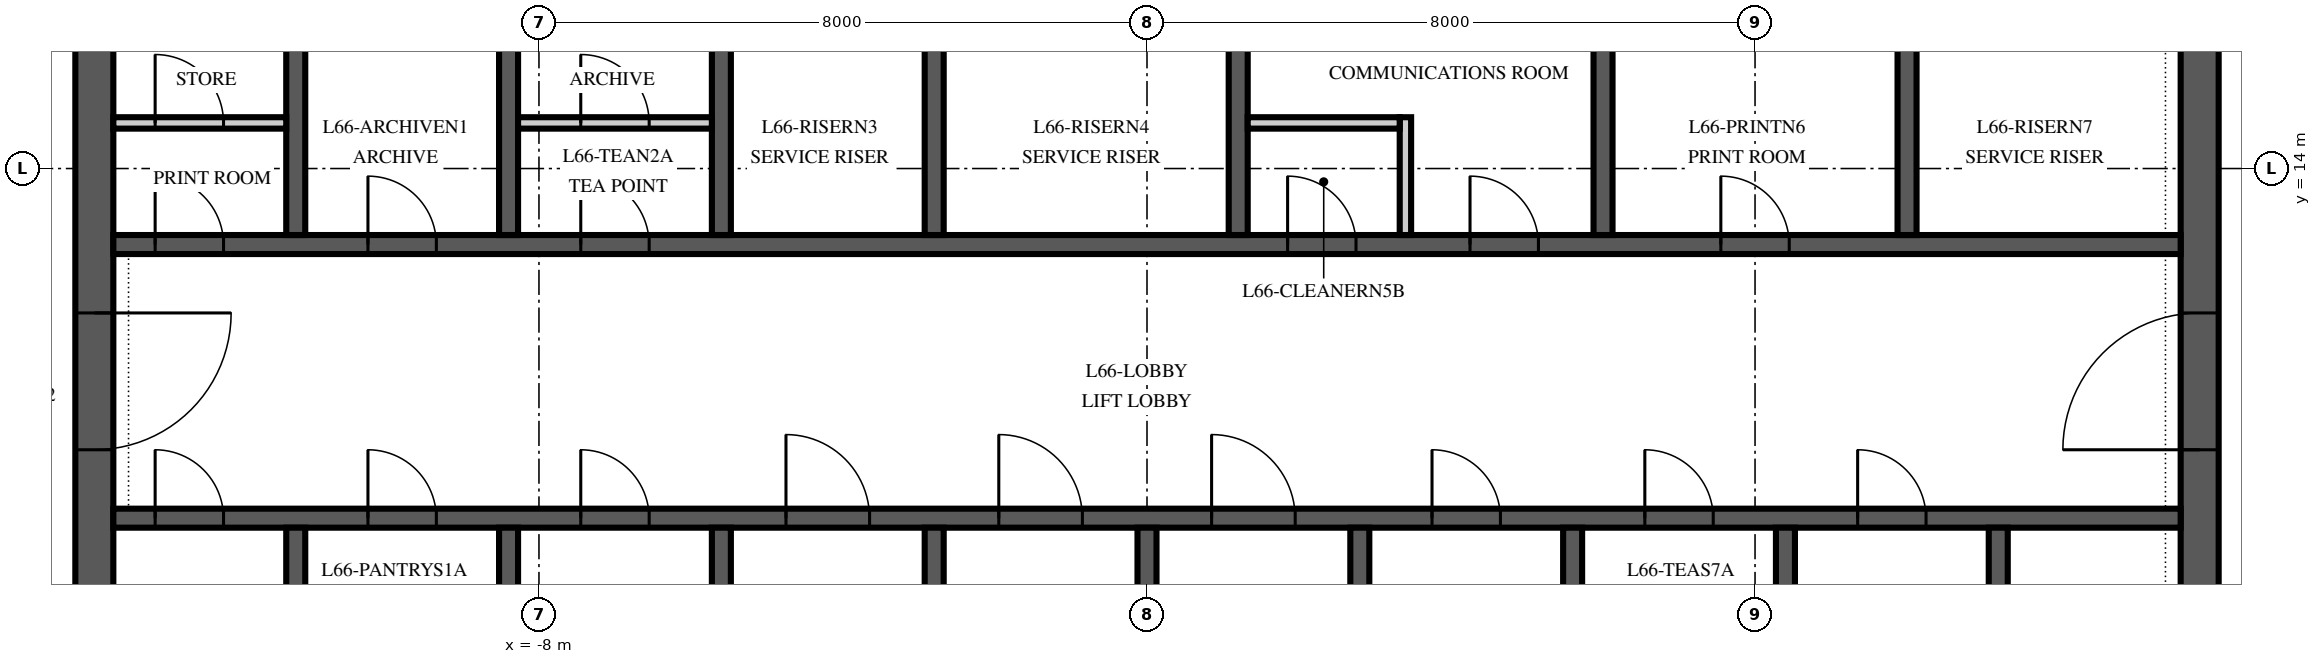
"""IFC4 building model, lengths in metres.
Left out: names, types, materials, properties, quantities, classifications, styles, units other than length and angle.
Written with IfcOpenShell. Run it as: python <this file> out.ifc"""

import sys

from ifc_helpers import new_model, si_unit, direction, frame, frame_2d, origin, place, context, subcontext, project, spatial, polyline, rectangle, outline, extrude, element, fill, save


model = new_model("IFC4")
c1 = context("Model", 3, precision=1e-05, world=origin(), true_north=direction((0.0, 1.0)))
c2 = subcontext(c1, "Body", "Model", "MODEL_VIEW")
j1 = project(units=[si_unit("LENGTHUNIT", "METRE"), si_unit("PLANEANGLEUNIT", "RADIAN")], contexts=[c1])
p1 = place(None, origin())
s1 = spatial("IfcSite", under=j1, at=p1, CompositionType="ELEMENT")
p2 = place(p1, origin())
s2 = spatial("IfcBuilding", under=s1, at=p2, CompositionType="ELEMENT")
p3 = place(p2, frame((0.0, 0.0, 284.0)))
s3 = spatial("IfcBuildingStorey", under=s2, at=p3, CompositionType="ELEMENT", Elevation=284.0)
p4 = place(p3, frame((13.85, 6.15, 0.0), z_axis=(0.0, 0.0, 1.0), x_axis=(0.0, 1.0, 0.0)))
e1 = element("IfcWall", 1, at=p4, inside=s3, PredefinedType="SHEAR", context=c2, shape_type="SweptSolid", body=[
    extrude(outline(polyline([(0.0, -0.25), (17.7, -0.25), (17.7, 0.0), (17.45, 0.0), (17.45, 0.25), (0.25, 0.25), (0.25, 0.0), (0.0, 0.0), (0.0, -0.25)])), origin(), (0.0, 0.0, 1.0), 4.0),
])
p5 = place(p4, frame((4.15, 0.0, 0.0)))
e2 = element("IfcOpeningElement", 2, at=p5, cuts=e1, PredefinedType="OPENING", context=c2, shape_type="SweptSolid", body=[
    extrude(rectangle(XDim=1.8, YDim=2.4, at=frame_2d((0.9, 1.2))), frame((0.0, 0.265, 0.0), z_axis=(0.0, -1.0, 0.0), x_axis=(1.0, 0.0, 0.0)), (0.0, 0.0, 1.0), 0.53),
])
p6 = place(p3, frame((-13.85, 23.85, 0.0), z_axis=(0.0, 0.0, 1.0), x_axis=(0.0, -1.0, 0.0)))
e3 = element("IfcWall", 3, at=p6, inside=s3, PredefinedType="SHEAR", context=c2, shape_type="SweptSolid", body=[
    extrude(outline(polyline([(0.0, -0.25), (17.7, -0.25), (17.7, 0.0), (17.45, 0.0), (17.45, 0.25), (0.25, 0.25), (0.25, 0.0), (0.0, 0.0), (0.0, -0.25)])), origin(), (0.0, 0.0, 1.0), 4.0),
])
p7 = place(p6, frame((11.75, 0.0, 0.0)))
e4 = element("IfcOpeningElement", 4, at=p7, cuts=e3, PredefinedType="OPENING", context=c2, shape_type="SweptSolid", body=[
    extrude(rectangle(XDim=1.8, YDim=2.4, at=frame_2d((0.9, 1.2))), frame((0.0, 0.265, 0.0), z_axis=(0.0, -1.0, 0.0), x_axis=(1.0, 0.0, 0.0)), (0.0, 0.0, 1.0), 0.53),
])
p8 = place(p3, frame((-13.6, 9.4, 0.0), z_axis=(0.0, 0.0, 1.0), x_axis=(1.0, 0.0, 0.0)))
e5 = element("IfcWall", 5, at=p8, inside=s3, PredefinedType="SHEAR", context=c2, shape_type="SweptSolid", body=[
    extrude(rectangle(XDim=27.2, YDim=0.25, at=frame_2d((13.6, 0.0))), origin(), (0.0, 0.0, 1.0), 4.0),
])
p9 = place(p8, frame((8.85, 0.0, 0.0)))
e6 = element("IfcOpeningElement", 6, at=p9, cuts=e5, PredefinedType="OPENING", context=c2, shape_type="SweptSolid", body=[
    extrude(rectangle(XDim=1.1, YDim=2.1, at=frame_2d((0.55, 1.05))), frame((0.0, 0.14, 0.0), z_axis=(0.0, -1.0, 0.0), x_axis=(1.0, 0.0, 0.0)), (0.0, 0.0, 1.0), 0.28),
])
p10 = place(p8, frame((11.65, 0.0, 0.0)))
e7 = element("IfcOpeningElement", 7, at=p10, cuts=e5, PredefinedType="OPENING", context=c2, shape_type="SweptSolid", body=[
    extrude(rectangle(XDim=1.1, YDim=2.1, at=frame_2d((0.55, 1.05))), frame((0.0, 0.14, 0.0), z_axis=(0.0, -1.0, 0.0), x_axis=(1.0, 0.0, 0.0)), (0.0, 0.0, 1.0), 0.28),
])
p11 = place(p8, frame((14.45, 0.0, 0.0)))
e8 = element("IfcOpeningElement", 8, at=p11, cuts=e5, PredefinedType="OPENING", context=c2, shape_type="SweptSolid", body=[
    extrude(rectangle(XDim=1.1, YDim=2.1, at=frame_2d((0.55, 1.05))), frame((0.0, 0.14, 0.0), z_axis=(0.0, -1.0, 0.0), x_axis=(1.0, 0.0, 0.0)), (0.0, 0.0, 1.0), 0.28),
])
p12 = place(p8, frame((0.55, 0.0, 0.0)))
e9 = element("IfcOpeningElement", 9, at=p12, cuts=e5, PredefinedType="OPENING", context=c2, shape_type="SweptSolid", body=[
    extrude(rectangle(XDim=0.9, YDim=2.1, at=frame_2d((0.45, 1.05))), frame((0.0, 0.14, 0.0), z_axis=(0.0, -1.0, 0.0), x_axis=(1.0, 0.0, 0.0)), (0.0, 0.0, 1.0), 0.28),
])
p13 = place(p8, frame((3.35, 0.0, 0.0)))
e10 = element("IfcOpeningElement", 10, at=p13, cuts=e5, PredefinedType="OPENING", context=c2, shape_type="SweptSolid", body=[
    extrude(rectangle(XDim=0.9, YDim=2.1, at=frame_2d((0.45, 1.05))), frame((0.0, 0.14, 0.0), z_axis=(0.0, -1.0, 0.0), x_axis=(1.0, 0.0, 0.0)), (0.0, 0.0, 1.0), 0.28),
])
p14 = place(p8, frame((6.15, 0.0, 0.0)))
e11 = element("IfcOpeningElement", 11, at=p14, cuts=e5, PredefinedType="OPENING", context=c2, shape_type="SweptSolid", body=[
    extrude(rectangle(XDim=0.9, YDim=2.1, at=frame_2d((0.45, 1.05))), frame((0.0, 0.14, 0.0), z_axis=(0.0, -1.0, 0.0), x_axis=(1.0, 0.0, 0.0)), (0.0, 0.0, 1.0), 0.28),
])
p15 = place(p8, frame((17.35, 0.0, 0.0)))
e12 = element("IfcOpeningElement", 12, at=p15, cuts=e5, PredefinedType="OPENING", context=c2, shape_type="SweptSolid", body=[
    extrude(rectangle(XDim=0.9, YDim=2.1, at=frame_2d((0.45, 1.05))), frame((0.0, 0.14, 0.0), z_axis=(0.0, -1.0, 0.0), x_axis=(1.0, 0.0, 0.0)), (0.0, 0.0, 1.0), 0.28),
])
p16 = place(p8, frame((20.15, 0.0, 0.0)))
e13 = element("IfcOpeningElement", 13, at=p16, cuts=e5, PredefinedType="OPENING", context=c2, shape_type="SweptSolid", body=[
    extrude(rectangle(XDim=0.9, YDim=2.1, at=frame_2d((0.45, 1.05))), frame((0.0, 0.14, 0.0), z_axis=(0.0, -1.0, 0.0), x_axis=(1.0, 0.0, 0.0)), (0.0, 0.0, 1.0), 0.28),
])
p17 = place(p8, frame((22.95, 0.0, 0.0)))
e14 = element("IfcOpeningElement", 14, at=p17, cuts=e5, PredefinedType="OPENING", context=c2, shape_type="SweptSolid", body=[
    extrude(rectangle(XDim=0.9, YDim=2.1, at=frame_2d((0.45, 1.05))), frame((0.0, 0.14, 0.0), z_axis=(0.0, -1.0, 0.0), x_axis=(1.0, 0.0, 0.0)), (0.0, 0.0, 1.0), 0.28),
])
p18 = place(p3, frame((-13.6, 13.0, 0.0), z_axis=(0.0, 0.0, 1.0), x_axis=(1.0, 0.0, 0.0)))
e15 = element("IfcWall", 15, at=p18, inside=s3, PredefinedType="SHEAR", context=c2, shape_type="SweptSolid", body=[
    extrude(rectangle(XDim=27.2, YDim=0.25, at=frame_2d((13.6, 0.0))), origin(), (0.0, 0.0, 1.0), 4.0),
])
p19 = place(p18, frame((17.85, 0.0, 0.0)))
e16 = element("IfcOpeningElement", 16, at=p19, cuts=e15, PredefinedType="OPENING", context=c2, shape_type="SweptSolid", body=[
    extrude(rectangle(XDim=0.9, YDim=2.1, at=frame_2d((0.45, 1.05))), frame((0.0, 0.14, 0.0), z_axis=(0.0, -1.0, 0.0), x_axis=(1.0, 0.0, 0.0)), (0.0, 0.0, 1.0), 0.28),
])
p20 = place(p18, frame((15.45, 0.0, 0.0)))
e17 = element("IfcOpeningElement", 17, at=p20, cuts=e15, PredefinedType="OPENING", context=c2, shape_type="SweptSolid", body=[
    extrude(rectangle(XDim=0.9, YDim=2.1, at=frame_2d((0.45, 1.05))), frame((0.0, 0.14, 0.0), z_axis=(0.0, -1.0, 0.0), x_axis=(1.0, 0.0, 0.0)), (0.0, 0.0, 1.0), 0.28),
])
p21 = place(p18, frame((21.15, 0.0, 0.0)))
e18 = element("IfcOpeningElement", 18, at=p21, cuts=e15, PredefinedType="OPENING", context=c2, shape_type="SweptSolid", body=[
    extrude(rectangle(XDim=0.9, YDim=2.1, at=frame_2d((0.45, 1.05))), frame((0.0, 0.14, 0.0), z_axis=(0.0, -1.0, 0.0), x_axis=(1.0, 0.0, 0.0)), (0.0, 0.0, 1.0), 0.28),
])
p22 = place(p18, frame((0.55, 0.0, 0.0)))
e19 = element("IfcOpeningElement", 19, at=p22, cuts=e15, PredefinedType="OPENING", context=c2, shape_type="SweptSolid", body=[
    extrude(rectangle(XDim=0.9, YDim=2.1, at=frame_2d((0.45, 1.05))), frame((0.0, 0.14, 0.0), z_axis=(0.0, -1.0, 0.0), x_axis=(1.0, 0.0, 0.0)), (0.0, 0.0, 1.0), 0.28),
])
p23 = place(p18, frame((3.35, 0.0, 0.0)))
e20 = element("IfcOpeningElement", 20, at=p23, cuts=e15, PredefinedType="OPENING", context=c2, shape_type="SweptSolid", body=[
    extrude(rectangle(XDim=0.9, YDim=2.1, at=frame_2d((0.45, 1.05))), frame((0.0, 0.14, 0.0), z_axis=(0.0, -1.0, 0.0), x_axis=(1.0, 0.0, 0.0)), (0.0, 0.0, 1.0), 0.28),
])
p24 = place(p18, frame((6.15, 0.0, 0.0)))
e21 = element("IfcOpeningElement", 21, at=p24, cuts=e15, PredefinedType="OPENING", context=c2, shape_type="SweptSolid", body=[
    extrude(rectangle(XDim=0.9, YDim=2.1, at=frame_2d((0.45, 1.05))), frame((0.0, 0.14, 0.0), z_axis=(0.0, -1.0, 0.0), x_axis=(1.0, 0.0, 0.0)), (0.0, 0.0, 1.0), 0.28),
])
for number, where, z_axis, x_axis in (
    (22, (-11.2, 6.4, 0.0), (0.0, 0.0, 1.0), (0.0, 1.0, 0.0)),
    (23, (-8.4, 6.4, 0.0), (0.0, 0.0, 1.0), (0.0, 1.0, 0.0)),
    (24, (-5.6, 6.4, 0.0), (0.0, 0.0, 1.0), (0.0, 1.0, 0.0)),
    (25, (-2.8, 6.4, 0.0), (0.0, 0.0, 1.0), (0.0, 1.0, 0.0)),
    (26, (0.0, 6.4, 0.0), (0.0, 0.0, 1.0), (0.0, 1.0, 0.0)),
    (27, (2.8, 6.4, 0.0), (0.0, 0.0, 1.0), (0.0, 1.0, 0.0)),
    (28, (5.6, 6.4, 0.0), (0.0, 0.0, 1.0), (0.0, 1.0, 0.0)),
    (29, (8.4, 6.4, 0.0), (0.0, 0.0, 1.0), (0.0, 1.0, 0.0)),
    (30, (11.2, 6.4, 0.0), (0.0, 0.0, 1.0), (0.0, 1.0, 0.0)),
):
    element("IfcWall", number, at=place(p3, frame(where, z_axis=z_axis, x_axis=x_axis)), inside=s3, PredefinedType="SHEAR", context=c2, shape_type="SweptSolid", body=[
        extrude(rectangle(XDim=2.875, YDim=0.25, at=frame_2d((1.438, 0.0))), origin(), (0.0, 0.0, 1.0), 4.0),
    ])
for number, where, z_axis, x_axis in (
    (31, (-11.2, 13.125, 0.0), (0.0, 0.0, 1.0), (0.0, 1.0, 0.0)),
    (32, (-8.4, 13.125, 0.0), (0.0, 0.0, 1.0), (0.0, 1.0, 0.0)),
    (33, (-5.6, 13.125, 0.0), (0.0, 0.0, 1.0), (0.0, 1.0, 0.0)),
    (34, (-2.8, 13.125, 0.0), (0.0, 0.0, 1.0), (0.0, 1.0, 0.0)),
    (35, (1.2, 13.125, 0.0), (0.0, 0.0, 1.0), (0.0, 1.0, 0.0)),
    (36, (6.0, 13.125, 0.0), (0.0, 0.0, 1.0), (0.0, 1.0, 0.0)),
    (37, (10.0, 13.125, 0.0), (0.0, 0.0, 1.0), (0.0, 1.0, 0.0)),
):
    element("IfcWall", number, at=place(p3, frame(where, z_axis=z_axis, x_axis=x_axis)), inside=s3, PredefinedType="SHEAR", context=c2, shape_type="SweptSolid", body=[
        extrude(rectangle(XDim=2.75, YDim=0.25, at=frame_2d((1.375, 0.0))), origin(), (0.0, 0.0, 1.0), 4.0),
    ])
p25 = place(p3, frame((3.4, 13.125, 0.0), z_axis=(0.0, 0.0, 1.0), x_axis=(0.0, 1.0, 0.0)))
e38 = element("IfcWall", 38, at=p25, inside=s3, PredefinedType="PARTITIONING", context=c2, shape_type="SweptSolid", body=[
    extrude(rectangle(XDim=1.55, YDim=0.15, at=frame_2d((0.775, 0.0))), origin(), (0.0, 0.0, 1.0), 3.85),
])
p26 = place(p3, frame((1.325, 14.6, 0.0), z_axis=(0.0, 0.0, 1.0), x_axis=(1.0, 0.0, 0.0)))
e39 = element("IfcWall", 39, at=p26, inside=s3, PredefinedType="PARTITIONING", context=c2, shape_type="SweptSolid", body=[
    extrude(rectangle(XDim=2.0, YDim=0.15, at=frame_2d((1.0, 0.0))), origin(), (0.0, 0.0, 1.0), 3.85),
])
p27 = place(p3, frame((-13.6, 14.6, 0.0), z_axis=(0.0, 0.0, 1.0), x_axis=(1.0, 0.0, 0.0)))
e40 = element("IfcWall", 40, at=p27, inside=s3, PredefinedType="PARTITIONING", context=c2, shape_type="SweptSolid", body=[
    extrude(rectangle(XDim=2.275, YDim=0.15, at=frame_2d((1.138, 0.0))), origin(), (0.0, 0.0, 1.0), 3.85),
])
p28 = place(p27, frame((0.55, 0.0, 0.0)))
e41 = element("IfcOpeningElement", 41, at=p28, cuts=e40, PredefinedType="OPENING", context=c2, shape_type="SweptSolid", body=[
    extrude(rectangle(XDim=0.9, YDim=2.1, at=frame_2d((0.45, 1.05))), frame((0.0, 0.09, 0.0), z_axis=(0.0, -1.0, 0.0), x_axis=(1.0, 0.0, 0.0)), (0.0, 0.0, 1.0), 0.18),
])
p29 = place(p3, frame((-8.275, 14.6, 0.0), z_axis=(0.0, 0.0, 1.0), x_axis=(1.0, 0.0, 0.0)))
e42 = element("IfcWall", 42, at=p29, inside=s3, PredefinedType="PARTITIONING", context=c2, shape_type="SweptSolid", body=[
    extrude(rectangle(XDim=2.55, YDim=0.15, at=frame_2d((1.275, 0.0))), origin(), (0.0, 0.0, 1.0), 3.85),
])
p30 = place(p29, frame((0.825, 0.0, 0.0)))
e43 = element("IfcOpeningElement", 43, at=p30, cuts=e42, PredefinedType="OPENING", context=c2, shape_type="SweptSolid", body=[
    extrude(rectangle(XDim=0.9, YDim=2.1, at=frame_2d((0.45, 1.05))), frame((0.0, 0.09, 0.0), z_axis=(0.0, -1.0, 0.0), x_axis=(1.0, 0.0, 0.0)), (0.0, 0.0, 1.0), 0.18),
])
p31 = place(p5, origin())
e44 = element("IfcDoor", 44, at=p31, inside=s3, OperationType="DOUBLE_DOOR_SINGLE_SWING", PredefinedType="DOOR", context=c2, shape_type="SweptSolid", body=[
    extrude(rectangle(XDim=1.8, YDim=2.4, at=frame_2d((0.9, 1.2))), frame((0.0, 0.25, 0.0), z_axis=(0.0, -1.0, 0.0), x_axis=(1.0, 0.0, 0.0)), (0.0, 0.0, 1.0), 0.5),
])
fill(e2, e44)
p32 = place(p7, origin())
e45 = element("IfcDoor", 45, at=p32, inside=s3, OperationType="DOUBLE_DOOR_SINGLE_SWING", PredefinedType="DOOR", context=c2, shape_type="SweptSolid", body=[
    extrude(rectangle(XDim=1.8, YDim=2.4, at=frame_2d((0.9, 1.2))), frame((0.0, 0.25, 0.0), z_axis=(0.0, -1.0, 0.0), x_axis=(1.0, 0.0, 0.0)), (0.0, 0.0, 1.0), 0.5),
])
fill(e4, e45)
p33 = place(p9, origin())
e46 = element("IfcDoor", 46, at=p33, inside=s3, OperationType="SLIDING_TO_LEFT", PredefinedType="DOOR", context=c2, shape_type="SweptSolid", body=[
    extrude(rectangle(XDim=1.1, YDim=2.1, at=frame_2d((0.55, 1.05))), frame((0.0, 0.125, 0.0), z_axis=(0.0, -1.0, 0.0), x_axis=(1.0, 0.0, 0.0)), (0.0, 0.0, 1.0), 0.25),
])
fill(e6, e46)
p34 = place(p10, origin())
e47 = element("IfcDoor", 47, at=p34, inside=s3, OperationType="SLIDING_TO_LEFT", PredefinedType="DOOR", context=c2, shape_type="SweptSolid", body=[
    extrude(rectangle(XDim=1.1, YDim=2.1, at=frame_2d((0.55, 1.05))), frame((0.0, 0.125, 0.0), z_axis=(0.0, -1.0, 0.0), x_axis=(1.0, 0.0, 0.0)), (0.0, 0.0, 1.0), 0.25),
])
fill(e7, e47)
p35 = place(p11, origin())
e48 = element("IfcDoor", 48, at=p35, inside=s3, OperationType="SLIDING_TO_LEFT", PredefinedType="DOOR", context=c2, shape_type="SweptSolid", body=[
    extrude(rectangle(XDim=1.1, YDim=2.1, at=frame_2d((0.55, 1.05))), frame((0.0, 0.125, 0.0), z_axis=(0.0, -1.0, 0.0), x_axis=(1.0, 0.0, 0.0)), (0.0, 0.0, 1.0), 0.25),
])
fill(e8, e48)
p36 = place(p19, origin())
e49 = element("IfcDoor", 49, at=p36, inside=s3, OperationType="SINGLE_SWING_LEFT", PredefinedType="DOOR", context=c2, shape_type="SweptSolid", body=[
    extrude(rectangle(XDim=0.9, YDim=2.1, at=frame_2d((0.45, 1.05))), frame((0.0, 0.125, 0.0), z_axis=(0.0, -1.0, 0.0), x_axis=(1.0, 0.0, 0.0)), (0.0, 0.0, 1.0), 0.25),
])
fill(e16, e49)
p37 = place(p20, origin())
e50 = element("IfcDoor", 50, at=p37, inside=s3, OperationType="SINGLE_SWING_LEFT", PredefinedType="DOOR", context=c2, shape_type="SweptSolid", body=[
    extrude(rectangle(XDim=0.9, YDim=2.1, at=frame_2d((0.45, 1.05))), frame((0.0, 0.125, 0.0), z_axis=(0.0, -1.0, 0.0), x_axis=(1.0, 0.0, 0.0)), (0.0, 0.0, 1.0), 0.25),
])
fill(e17, e50)
p38 = place(p21, origin())
e51 = element("IfcDoor", 51, at=p38, inside=s3, OperationType="SINGLE_SWING_LEFT", PredefinedType="DOOR", context=c2, shape_type="SweptSolid", body=[
    extrude(rectangle(XDim=0.9, YDim=2.1, at=frame_2d((0.45, 1.05))), frame((0.0, 0.125, 0.0), z_axis=(0.0, -1.0, 0.0), x_axis=(1.0, 0.0, 0.0)), (0.0, 0.0, 1.0), 0.25),
])
fill(e18, e51)
p39 = place(p22, origin())
e52 = element("IfcDoor", 52, at=p39, inside=s3, OperationType="SINGLE_SWING_LEFT", PredefinedType="DOOR", context=c2, shape_type="SweptSolid", body=[
    extrude(rectangle(XDim=0.9, YDim=2.1, at=frame_2d((0.45, 1.05))), frame((0.0, 0.125, 0.0), z_axis=(0.0, -1.0, 0.0), x_axis=(1.0, 0.0, 0.0)), (0.0, 0.0, 1.0), 0.25),
])
fill(e19, e52)
p40 = place(p28, origin())
e53 = element("IfcDoor", 53, at=p40, inside=s3, OperationType="SINGLE_SWING_LEFT", PredefinedType="DOOR", context=c2, shape_type="SweptSolid", body=[
    extrude(rectangle(XDim=0.9, YDim=2.1, at=frame_2d((0.45, 1.05))), frame((0.0, 0.075, 0.0), z_axis=(0.0, -1.0, 0.0), x_axis=(1.0, 0.0, 0.0)), (0.0, 0.0, 1.0), 0.149),
])
fill(e41, e53)
p41 = place(p23, origin())
e54 = element("IfcDoor", 54, at=p41, inside=s3, OperationType="SINGLE_SWING_LEFT", PredefinedType="DOOR", context=c2, shape_type="SweptSolid", body=[
    extrude(rectangle(XDim=0.9, YDim=2.1, at=frame_2d((0.45, 1.05))), frame((0.0, 0.125, 0.0), z_axis=(0.0, -1.0, 0.0), x_axis=(1.0, 0.0, 0.0)), (0.0, 0.0, 1.0), 0.25),
])
fill(e20, e54)
p42 = place(p24, origin())
e55 = element("IfcDoor", 55, at=p42, inside=s3, OperationType="SINGLE_SWING_LEFT", PredefinedType="DOOR", context=c2, shape_type="SweptSolid", body=[
    extrude(rectangle(XDim=0.9, YDim=2.1, at=frame_2d((0.45, 1.05))), frame((0.0, 0.125, 0.0), z_axis=(0.0, -1.0, 0.0), x_axis=(1.0, 0.0, 0.0)), (0.0, 0.0, 1.0), 0.25),
])
fill(e21, e55)
p43 = place(p30, origin())
e56 = element("IfcDoor", 56, at=p43, inside=s3, OperationType="SINGLE_SWING_LEFT", PredefinedType="DOOR", context=c2, shape_type="SweptSolid", body=[
    extrude(rectangle(XDim=0.9, YDim=2.1, at=frame_2d((0.45, 1.05))), frame((0.0, 0.075, 0.0), z_axis=(0.0, -1.0, 0.0), x_axis=(1.0, 0.0, 0.0)), (0.0, 0.0, 1.0), 0.149),
])
fill(e43, e56)
p44 = place(p12, origin())
e57 = element("IfcDoor", 57, at=p44, inside=s3, OperationType="SINGLE_SWING_LEFT", PredefinedType="DOOR", context=c2, shape_type="SweptSolid", body=[
    extrude(rectangle(XDim=0.9, YDim=2.1, at=frame_2d((0.45, 1.05))), frame((0.0, 0.125, 0.0), z_axis=(0.0, -1.0, 0.0), x_axis=(1.0, 0.0, 0.0)), (0.0, 0.0, 1.0), 0.25),
])
fill(e9, e57)
p45 = place(p13, origin())
e58 = element("IfcDoor", 58, at=p45, inside=s3, OperationType="SINGLE_SWING_LEFT", PredefinedType="DOOR", context=c2, shape_type="SweptSolid", body=[
    extrude(rectangle(XDim=0.9, YDim=2.1, at=frame_2d((0.45, 1.05))), frame((0.0, 0.125, 0.0), z_axis=(0.0, -1.0, 0.0), x_axis=(1.0, 0.0, 0.0)), (0.0, 0.0, 1.0), 0.25),
])
fill(e10, e58)
p46 = place(p14, origin())
e59 = element("IfcDoor", 59, at=p46, inside=s3, OperationType="SINGLE_SWING_LEFT", PredefinedType="DOOR", context=c2, shape_type="SweptSolid", body=[
    extrude(rectangle(XDim=0.9, YDim=2.1, at=frame_2d((0.45, 1.05))), frame((0.0, 0.125, 0.0), z_axis=(0.0, -1.0, 0.0), x_axis=(1.0, 0.0, 0.0)), (0.0, 0.0, 1.0), 0.25),
])
fill(e11, e59)
p47 = place(p15, origin())
e60 = element("IfcDoor", 60, at=p47, inside=s3, OperationType="SINGLE_SWING_LEFT", PredefinedType="DOOR", context=c2, shape_type="SweptSolid", body=[
    extrude(rectangle(XDim=0.9, YDim=2.1, at=frame_2d((0.45, 1.05))), frame((0.0, 0.125, 0.0), z_axis=(0.0, -1.0, 0.0), x_axis=(1.0, 0.0, 0.0)), (0.0, 0.0, 1.0), 0.25),
])
fill(e12, e60)
p48 = place(p16, origin())
e61 = element("IfcDoor", 61, at=p48, inside=s3, OperationType="SINGLE_SWING_LEFT", PredefinedType="DOOR", context=c2, shape_type="SweptSolid", body=[
    extrude(rectangle(XDim=0.9, YDim=2.1, at=frame_2d((0.45, 1.05))), frame((0.0, 0.125, 0.0), z_axis=(0.0, -1.0, 0.0), x_axis=(1.0, 0.0, 0.0)), (0.0, 0.0, 1.0), 0.25),
])
fill(e13, e61)
p49 = place(p17, origin())
e62 = element("IfcDoor", 62, at=p49, inside=s3, OperationType="SINGLE_SWING_LEFT", PredefinedType="DOOR", context=c2, shape_type="SweptSolid", body=[
    extrude(rectangle(XDim=0.9, YDim=2.1, at=frame_2d((0.45, 1.05))), frame((0.0, 0.125, 0.0), z_axis=(0.0, -1.0, 0.0), x_axis=(1.0, 0.0, 0.0)), (0.0, 0.0, 1.0), 0.25),
])
fill(e14, e62)
save(model, sys.argv[1])
